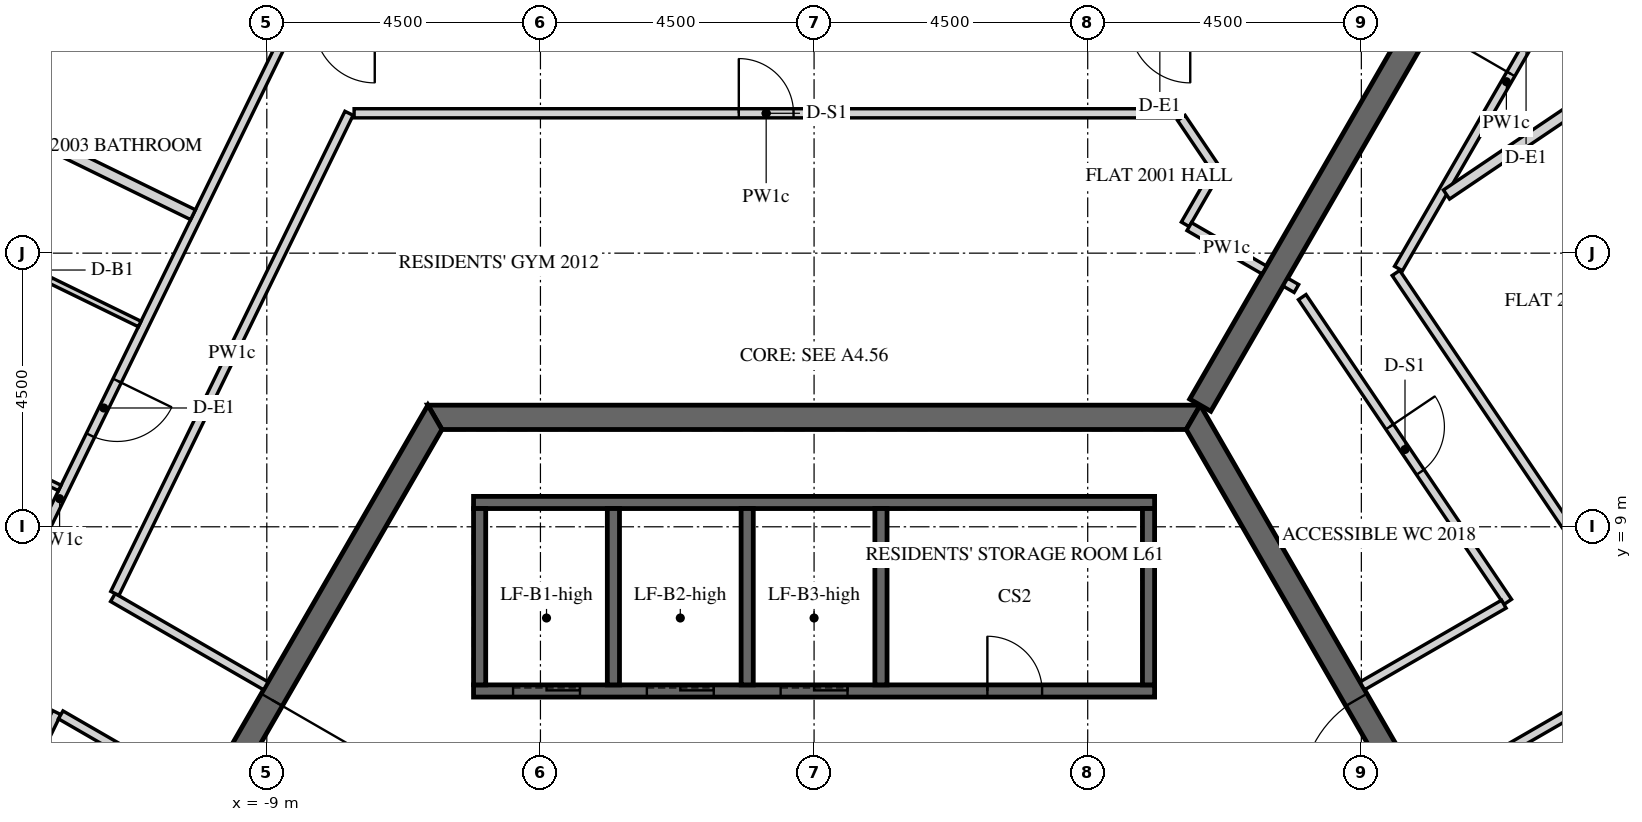
"""IFC4 building model, lengths in metres.
Left out: names, types, materials, properties, quantities, classifications, styles, units other than length and angle.
Written with IfcOpenShell. Run it as: python <this file> out.ifc"""

import sys

from ifc_helpers import new_model, si_unit, direction, frame, frame_2d, origin, place, context, subcontext, project, spatial, polyline, rectangle, outline, extrude, element, fill, save


model = new_model("IFC4")
c1 = context("Model", 3, precision=1e-05, world=origin(), true_north=direction((0.0, 1.0)))
c2 = subcontext(c1, "Body", "Model", "MODEL_VIEW")
j1 = project(units=[si_unit("LENGTHUNIT", "METRE"), si_unit("PLANEANGLEUNIT", "RADIAN")], contexts=[c1])
p1 = place(None, origin())
s1 = spatial("IfcSite", under=j1, at=p1, CompositionType="ELEMENT")
p2 = place(p1, origin())
s2 = spatial("IfcBuilding", under=s1, at=p2, CompositionType="ELEMENT")
p3 = place(p2, frame((0.0, 0.0, 256.2)))
s3 = spatial("IfcBuildingStorey", under=s2, at=p3, CompositionType="ELEMENT", Elevation=256.2)
p4 = place(p3, frame((-6.235, 10.8, 0.0), z_axis=(0.0, 0.0, 1.0), x_axis=(-0.499996419489, -0.866027470984, 0.0)))
e1 = element("IfcWall", 1, at=p4, inside=s3, PredefinedType="SHEAR", context=c2, shape_type="SweptSolid", body=[
    extrude(outline(polyline([(-0.115, -0.2), (12.586, -0.2), (12.355, 0.2), (0.115, 0.2), (-0.115, -0.2)])), origin(), (0.0, 0.0, 1.0), 3.75),
])
p5 = place(p4, frame((5.364, 0.0, 0.0)))
e2 = element("IfcOpeningElement", 2, at=p5, cuts=e1, PredefinedType="OPENING", context=c2, shape_type="SweptSolid", body=[
    extrude(rectangle(XDim=1.8, YDim=2.4, at=frame_2d((0.9, 1.2))), frame((0.0, 0.21, 0.0), z_axis=(0.0, -1.0, 0.0), x_axis=(1.0, 0.0, 0.0)), (0.0, 0.0, 1.0), 0.42),
])
p6 = place(p3, frame((12.471, 0.0, 0.0), z_axis=(0.0, 0.0, 1.0), x_axis=(-0.499996419489, 0.866027470984, 0.0)))
e3 = element("IfcWall", 3, at=p6, inside=s3, PredefinedType="SHEAR", context=c2, shape_type="SweptSolid", body=[
    extrude(outline(polyline([(-0.115, -0.2), (12.586, -0.2), (12.355, 0.2), (0.115, 0.2), (-0.115, -0.2)])), origin(), (0.0, 0.0, 1.0), 3.75),
])
p7 = place(p6, frame((5.306, 0.0, 0.0)))
e4 = element("IfcOpeningElement", 4, at=p7, cuts=e3, PredefinedType="OPENING", context=c2, shape_type="SweptSolid", body=[
    extrude(rectangle(XDim=1.8, YDim=2.4, at=frame_2d((0.9, 1.2))), frame((0.0, 0.21, 0.0), z_axis=(0.0, -1.0, 0.0), x_axis=(1.0, 0.0, 0.0)), (0.0, 0.0, 1.0), 0.42),
])
p8 = place(p3, frame((6.235, 10.8, 0.0), z_axis=(0.0, 0.0, 1.0), x_axis=(-1.0, 0.0, 0.0)))
e5 = element("IfcWall", 5, at=p8, inside=s3, PredefinedType="SHEAR", context=c2, shape_type="SweptSolid", body=[
    extrude(outline(polyline([(-0.115, -0.2), (12.586, -0.2), (12.355, 0.2), (0.115, 0.2), (-0.115, -0.2)])), origin(), (0.0, 0.0, 1.0), 3.75),
])
p9 = place(p3, frame((6.351, 11.0, 0.0), z_axis=(0.0, 0.0, 1.0), x_axis=(0.499998894578, 0.866026041999, 0.0)))
e6 = element("IfcWall", 6, at=p9, inside=s3, PredefinedType="SHEAR", context=c2, shape_type="SweptSolid", body=[
    extrude(rectangle(XDim=15.544, YDim=0.4, at=frame_2d((7.772, 0.0))), origin(), (0.0, 0.0, 1.0), 3.75),
])
p10 = place(p9, frame((6.872, 0.0, 0.0)))
e7 = element("IfcOpeningElement", 7, at=p10, cuts=e6, PredefinedType="OPENING", context=c2, shape_type="SweptSolid", body=[
    extrude(rectangle(XDim=1.8, YDim=2.4, at=frame_2d((0.9, 1.2))), frame((0.0, 0.21, 0.0), z_axis=(0.0, -1.0, 0.0), x_axis=(1.0, 0.0, 0.0)), (0.0, 0.0, 1.0), 0.42),
])
p11 = place(p3, frame((-5.6, 6.3, -0.5), z_axis=(0.0, 0.0, 1.0), x_axis=(1.0, 0.0, 0.0)))
e8 = element("IfcWall", 8, at=p11, inside=s3, PredefinedType="SHEAR", context=c2, shape_type="SweptSolid", body=[
    extrude(rectangle(XDim=11.2, YDim=0.2, at=frame_2d((5.6, 0.0))), origin(), (0.0, 0.0, 1.0), 4.15),
])
p12 = place(p11, frame((8.45, 0.0, 0.5)))
e9 = element("IfcOpeningElement", 9, at=p12, cuts=e8, PredefinedType="OPENING", context=c2, shape_type="SweptSolid", body=[
    extrude(rectangle(XDim=0.9, YDim=2.1, at=frame_2d((0.45, 1.05))), frame((0.0, 0.11, 0.0), z_axis=(0.0, -1.0, 0.0), x_axis=(1.0, 0.0, 0.0)), (0.0, 0.0, 1.0), 0.22),
])
p13 = place(p11, frame((0.65, 0.0, 0.5)))
e10 = element("IfcOpeningElement", 10, at=p13, cuts=e8, PredefinedType="OPENING", context=c2, shape_type="SweptSolid", body=[
    extrude(rectangle(XDim=1.1, YDim=2.1, at=frame_2d((0.55, 1.05))), frame((0.0, 0.11, 0.0), z_axis=(0.0, -1.0, 0.0), x_axis=(1.0, 0.0, 0.0)), (0.0, 0.0, 1.0), 0.22),
])
p14 = place(p11, frame((2.85, 0.0, 0.5)))
e11 = element("IfcOpeningElement", 11, at=p14, cuts=e8, PredefinedType="OPENING", context=c2, shape_type="SweptSolid", body=[
    extrude(rectangle(XDim=1.1, YDim=2.1, at=frame_2d((0.55, 1.05))), frame((0.0, 0.11, 0.0), z_axis=(0.0, -1.0, 0.0), x_axis=(1.0, 0.0, 0.0)), (0.0, 0.0, 1.0), 0.22),
])
p15 = place(p11, frame((5.05, 0.0, 0.5)))
e12 = element("IfcOpeningElement", 12, at=p15, cuts=e8, PredefinedType="OPENING", context=c2, shape_type="SweptSolid", body=[
    extrude(rectangle(XDim=1.1, YDim=2.1, at=frame_2d((0.55, 1.05))), frame((0.0, 0.11, 0.0), z_axis=(0.0, -1.0, 0.0), x_axis=(1.0, 0.0, 0.0)), (0.0, 0.0, 1.0), 0.22),
])
p16 = place(p3, frame((-5.6, 9.4, -0.5), z_axis=(0.0, 0.0, 1.0), x_axis=(1.0, 0.0, 0.0)))
e13 = element("IfcWall", 13, at=p16, inside=s3, PredefinedType="SHEAR", context=c2, shape_type="SweptSolid", body=[
    extrude(rectangle(XDim=11.2, YDim=0.2, at=frame_2d((5.6, 0.0))), origin(), (0.0, 0.0, 1.0), 4.15),
])
for number, where, z_axis, x_axis in (
    (14, (-5.5, 6.4, -0.5), (0.0, 0.0, 1.0), (0.0, 1.0, 0.0)),
    (15, (-3.3, 6.4, -0.5), (0.0, 0.0, 1.0), (0.0, 1.0, 0.0)),
    (16, (-1.1, 6.4, -0.5), (0.0, 0.0, 1.0), (0.0, 1.0, 0.0)),
    (17, (1.1, 6.4, -0.5), (0.0, 0.0, 1.0), (0.0, 1.0, 0.0)),
    (18, (5.5, 6.4, -0.5), (0.0, 0.0, 1.0), (0.0, 1.0, 0.0)),
):
    element("IfcWall", number, at=place(p3, frame(where, z_axis=z_axis, x_axis=x_axis)), inside=s3, PredefinedType="SHEAR", context=c2, shape_type="SweptSolid", body=[
        extrude(rectangle(XDim=2.9, YDim=0.2, at=frame_2d((1.45, 0.0))), origin(), (0.0, 0.0, 1.0), 4.15),
    ])
p17 = place(p3, frame((-8.622, 17.225, 0.0), z_axis=(0.0, 0.0, 1.0), x_axis=(-0.438366544921, -0.898796290765, 0.0)))
e19 = element("IfcWall", 19, at=p17, inside=s3, PredefinedType="PARTITIONING", context=c2, shape_type="SweptSolid", body=[
    extrude(rectangle(XDim=17.273, YDim=0.15, at=frame_2d((8.637, 0.0))), origin(), (0.0, 0.0, 1.0), 2.823),
])
p18 = place(p17, frame((6.478, 0.0, 0.0)))
e20 = element("IfcOpeningElement", 20, at=p18, cuts=e19, PredefinedType="OPENING", context=c2, shape_type="SweptSolid", body=[
    extrude(rectangle(XDim=1.0, YDim=2.1, at=frame_2d((0.5, 1.05))), frame((0.0, 0.085, 0.0), z_axis=(0.0, -1.0, 0.0), x_axis=(1.0, 0.0, 0.0)), (0.0, 0.0, 1.0), 0.17),
])
p19 = place(p3, frame((-9.016, 6.384, 0.0), z_axis=(0.0, 0.0, 1.0), x_axis=(-0.866010648346, 0.500025556299, 0.0)))
e21 = element("IfcWall", 21, at=p19, inside=s3, PredefinedType="PARTITIONING", context=c2, shape_type="SweptSolid", body=[
    extrude(rectangle(XDim=2.905, YDim=0.15, at=frame_2d((1.453, 0.0))), origin(), (0.0, 0.0, 1.0), 2.823),
])
p20 = place(p3, frame((-11.499, 7.905, 0.0), z_axis=(0.0, 0.0, 1.0), x_axis=(0.438365041944, 0.898797023805, 0.0)))
e22 = element("IfcWall", 22, at=p20, inside=s3, PredefinedType="PARTITIONING", context=c2, shape_type="SweptSolid", body=[
    extrude(rectangle(XDim=8.784, YDim=0.15, at=frame_2d((4.392, 0.0))), origin(), (0.0, 0.0, 1.0), 2.823),
])
p21 = place(p3, frame((-7.564, 15.8, 0.0), z_axis=(0.0, 0.0, 1.0), x_axis=(1.0, 0.0, 0.0)))
e23 = element("IfcWall", 23, at=p21, inside=s3, PredefinedType="PARTITIONING", context=c2, shape_type="SweptSolid", body=[
    extrude(rectangle(XDim=13.553, YDim=0.15, at=frame_2d((6.776, 0.0))), origin(), (0.0, 0.0, 1.0), 2.823),
])
p22 = place(p21, frame((6.326, 0.0, 0.0)))
e24 = element("IfcOpeningElement", 24, at=p22, cuts=e23, PredefinedType="OPENING", context=c2, shape_type="SweptSolid", body=[
    extrude(rectangle(XDim=0.9, YDim=2.1, at=frame_2d((0.45, 1.05))), frame((0.0, 0.085, 0.0), z_axis=(0.0, -1.0, 0.0), x_axis=(1.0, 0.0, 0.0)), (0.0, 0.0, 1.0), 0.17),
])
p23 = place(p3, frame((6.039, 15.725, 0.0), z_axis=(0.0, 0.0, 1.0), x_axis=(0.559307154107, -0.828960498073, 0.0)))
e25 = element("IfcWall", 25, at=p23, inside=s3, PredefinedType="PARTITIONING", context=c2, shape_type="SweptSolid", body=[
    extrude(rectangle(XDim=1.038, YDim=0.15, at=frame_2d((0.519, 0.0))), origin(), (0.0, 0.0, 1.0), 2.823),
])
p24 = place(p3, frame((6.578, 14.793, 0.0), z_axis=(0.0, 0.0, 1.0), x_axis=(-0.499998034377, -0.866026538634, 0.0)))
e26 = element("IfcWall", 26, at=p24, inside=s3, PredefinedType="PARTITIONING", context=c2, shape_type="SweptSolid", body=[
    extrude(rectangle(XDim=0.946, YDim=0.15, at=frame_2d((0.473, 0.0))), origin(), (0.0, 0.0, 1.0), 2.823),
])
p25 = place(p3, frame((6.17, 13.936, 0.0), z_axis=(0.0, 0.0, 1.0), x_axis=(0.865988727248, -0.500063520245, 0.0)))
e27 = element("IfcWall", 27, at=p25, inside=s3, PredefinedType="PARTITIONING", context=c2, shape_type="SweptSolid", body=[
    extrude(rectangle(XDim=1.425, YDim=0.15, at=frame_2d((0.712, 0.0))), origin(), (0.0, 0.0, 1.0), 2.823),
])
p26 = place(p3, frame((-15.079, 0.564, 0.0), z_axis=(0.0, 0.0, 1.0), x_axis=(0.438367391904, 0.898795877669, 0.0)))
e28 = element("IfcWall", 28, at=p26, inside=s3, PredefinedType="PARTITIONING", context=c2, shape_type="SweptSolid", body=[
    extrude(rectangle(XDim=5.987, YDim=0.15, at=frame_2d((2.994, 0.0))), origin(), (0.0, 0.0, 1.0), 2.823),
])
p27 = place(p26, frame((2.543, 0.0, 0.0)))
e29 = element("IfcOpeningElement", 29, at=p27, cuts=e28, PredefinedType="OPENING", context=c2, shape_type="SweptSolid", body=[
    extrude(rectangle(XDim=0.9, YDim=2.1, at=frame_2d((0.45, 1.05))), frame((0.0, 0.085, 0.0), z_axis=(0.0, -1.0, 0.0), x_axis=(1.0, 0.0, 0.0)), (0.0, 0.0, 1.0), 0.17),
])
p28 = place(p3, frame((-12.389, 5.907, 0.0), z_axis=(0.0, 0.0, 1.0), x_axis=(0.866034066097, -0.499984996134, 0.0)))
e30 = element("IfcWall", 30, at=p28, inside=s3, PredefinedType="PARTITIONING", context=c2, shape_type="SweptSolid", body=[
    extrude(rectangle(XDim=2.683, YDim=0.15, at=frame_2d((1.342, 0.0))), origin(), (0.0, 0.0, 1.0), 2.823),
])
p29 = place(p3, frame((19.228, -1.146, 0.0), z_axis=(0.0, 0.0, 1.0), x_axis=(-0.559190017735, 0.829039519001, 0.0)))
e31 = element("IfcWall", 31, at=p29, inside=s3, PredefinedType="PARTITIONING", context=c2, shape_type="SweptSolid", body=[
    extrude(rectangle(XDim=17.273, YDim=0.15, at=frame_2d((8.637, 0.0))), origin(), (0.0, 0.0, 1.0), 2.823),
])
p30 = place(p29, frame((6.478, 0.0, 0.0)))
e32 = element("IfcOpeningElement", 32, at=p30, cuts=e31, PredefinedType="OPENING", context=c2, shape_type="SweptSolid", body=[
    extrude(rectangle(XDim=1.0, YDim=2.1, at=frame_2d((0.5, 1.05))), frame((0.0, 0.085, 0.0), z_axis=(0.0, -1.0, 0.0), x_axis=(1.0, 0.0, 0.0)), (0.0, 0.0, 1.0), 0.17),
])
p31 = place(p3, frame((9.611, 13.246, 0.0), z_axis=(0.0, 0.0, 1.0), x_axis=(0.499994435258, 0.866028616566, 0.0)))
e33 = element("IfcWall", 33, at=p31, inside=s3, PredefinedType="PARTITIONING", context=c2, shape_type="SweptSolid", body=[
    extrude(rectangle(XDim=7.097, YDim=0.15, at=frame_2d((3.548, 0.0))), origin(), (0.0, 0.0, 1.0), 2.823),
])
p32 = place(p31, frame((3.696, 0.0, 0.0)))
e34 = element("IfcOpeningElement", 34, at=p32, cuts=e33, PredefinedType="OPENING", context=c2, shape_type="SweptSolid", body=[
    extrude(rectangle(XDim=1.0, YDim=2.1, at=frame_2d((0.5, 1.05))), frame((0.0, 0.085, 0.0), z_axis=(0.0, -1.0, 0.0), x_axis=(1.0, 0.0, 0.0)), (0.0, 0.0, 1.0), 0.17),
])
p33 = place(p3, frame((10.066, 4.566, 0.0), z_axis=(0.0, 0.0, 1.0), x_axis=(0.866034661658, 0.49998396455, 0.0)))
e35 = element("IfcWall", 35, at=p33, inside=s3, PredefinedType="PARTITIONING", context=c2, shape_type="SweptSolid", body=[
    extrude(rectangle(XDim=2.909, YDim=0.15, at=frame_2d((1.455, 0.0))), origin(), (0.0, 0.0, 1.0), 2.823),
])
p34 = place(p3, frame((7.75, 13.024, 0.0), z_axis=(0.0, 0.0, 1.0), x_axis=(0.866088799389, -0.499890179513, 0.0)))
e36 = element("IfcWall", 36, at=p34, inside=s3, PredefinedType="PARTITIONING", context=c2, shape_type="SweptSolid", body=[
    extrude(rectangle(XDim=0.21, YDim=0.15, at=frame_2d((0.105, 0.0))), origin(), (0.0, 0.0, 1.0), 2.823),
])
p35 = place(p3, frame((8.028, 12.777, 0.0), z_axis=(0.0, 0.0, 1.0), x_axis=(0.559175239609, -0.829049486707, 0.0)))
e37 = element("IfcWall", 37, at=p35, inside=s3, PredefinedType="PARTITIONING", context=c2, shape_type="SweptSolid", body=[
    extrude(rectangle(XDim=6.045, YDim=0.15, at=frame_2d((3.022, 0.0))), origin(), (0.0, 0.0, 1.0), 2.823),
])
p36 = place(p35, frame((2.572, 0.0, 0.0)))
e38 = element("IfcOpeningElement", 38, at=p36, cuts=e37, PredefinedType="OPENING", context=c2, shape_type="SweptSolid", body=[
    extrude(rectangle(XDim=0.9, YDim=2.1, at=frame_2d((0.45, 1.05))), frame((0.0, 0.085, 0.0), z_axis=(0.0, -1.0, 0.0), x_axis=(1.0, 0.0, 0.0)), (0.0, 0.0, 1.0), 0.17),
])
p37 = place(p3, frame((11.343, 7.728, 0.0), z_axis=(0.0, 0.0, 1.0), x_axis=(-0.866037314867, -0.499979368833, 0.0)))
e39 = element("IfcWall", 39, at=p37, inside=s3, PredefinedType="PARTITIONING", context=c2, shape_type="SweptSolid", body=[
    extrude(rectangle(XDim=2.687, YDim=0.15, at=frame_2d((1.344, 0.0))), origin(), (0.0, 0.0, 1.0), 2.823),
])
p38 = place(p3, frame((-17.516, 17.694, 0.0), z_axis=(0.0, 0.0, 1.0), x_axis=(0.898794723364, -0.438369758597, 0.0)))
e40 = element("IfcWall", 40, at=p38, inside=s3, PredefinedType="PARTITIONING", context=c2, shape_type="SweptSolid", body=[
    extrude(rectangle(XDim=8.125, YDim=0.18, at=frame_2d((4.062, 0.0))), origin(), (0.0, 0.0, 1.0), 2.823),
])
p39 = place(p3, frame((-12.405, 9.638, 0.0), z_axis=(0.0, 0.0, 1.0), x_axis=(-0.898810534939, 0.438337338454, 0.0)))
e41 = element("IfcWall", 41, at=p39, inside=s3, PredefinedType="PARTITIONING", context=c2, shape_type="SweptSolid", body=[
    extrude(rectangle(XDim=4.125, YDim=0.1, at=frame_2d((2.062, 0.0))), origin(), (0.0, 0.0, 1.0), 2.823),
])
p40 = place(p39, frame((1.575, 0.0, 0.0)))
e42 = element("IfcOpeningElement", 42, at=p40, cuts=e41, PredefinedType="OPENING", context=c2, shape_type="SweptSolid", body=[
    extrude(rectangle(XDim=0.9, YDim=2.1, at=frame_2d((0.45, 1.05))), frame((0.0, 0.06, 0.0), z_axis=(0.0, -1.0, 0.0), x_axis=(1.0, 0.0, 0.0)), (0.0, 0.0, 1.0), 0.12),
])
p41 = place(p3, frame((-11.09, 12.335, 0.0), z_axis=(0.0, 0.0, 1.0), x_axis=(-0.898787215731, 0.438385151252, 0.0)))
e43 = element("IfcWall", 43, at=p41, inside=s3, PredefinedType="PARTITIONING", context=c2, shape_type="SweptSolid", body=[
    extrude(rectangle(XDim=4.125, YDim=0.1, at=frame_2d((2.062, 0.0))), origin(), (0.0, 0.0, 1.0), 2.823),
])
p42 = place(p41, frame((1.625, 0.0, 0.0)))
e44 = element("IfcOpeningElement", 44, at=p42, cuts=e43, PredefinedType="OPENING", context=c2, shape_type="SweptSolid", body=[
    extrude(rectangle(XDim=0.8, YDim=2.1, at=frame_2d((0.4, 1.05))), frame((0.0, 0.06, 0.0), z_axis=(0.0, -1.0, 0.0), x_axis=(1.0, 0.0, 0.0)), (0.0, 0.0, 1.0), 0.12),
])
p43 = place(p3, frame((16.029, 18.26, 0.0), z_axis=(0.0, 0.0, 1.0), x_axis=(-0.82904538001, -0.559181328268, 0.0)))
e45 = element("IfcWall", 45, at=p43, inside=s3, PredefinedType="PARTITIONING", context=c2, shape_type="SweptSolid", body=[
    extrude(rectangle(XDim=6.79, YDim=0.18, at=frame_2d((3.395, 0.0))), origin(), (0.0, 0.0, 1.0), 2.823),
])
p44 = place(p5, origin())
e46 = element("IfcDoor", 46, at=p44, inside=s3, OperationType="DOUBLE_DOOR_SINGLE_SWING", PredefinedType="DOOR", context=c2, shape_type="SweptSolid", body=[
    extrude(rectangle(XDim=1.8, YDim=2.4, at=frame_2d((0.9, 1.2))), frame((0.0, 0.025, 0.0), z_axis=(0.0, -1.0, 0.0), x_axis=(1.0, 0.0, 0.0)), (0.0, 0.0, 1.0), 0.05),
])
fill(e2, e46)
p45 = place(p7, origin())
e47 = element("IfcDoor", 47, at=p45, inside=s3, OperationType="DOUBLE_DOOR_SINGLE_SWING", PredefinedType="DOOR", context=c2, shape_type="SweptSolid", body=[
    extrude(rectangle(XDim=1.8, YDim=2.4, at=frame_2d((0.9, 1.2))), frame((0.0, 0.025, 0.0), z_axis=(0.0, -1.0, 0.0), x_axis=(1.0, 0.0, 0.0)), (0.0, 0.0, 1.0), 0.05),
])
fill(e4, e47)
p46 = place(p12, origin())
e48 = element("IfcDoor", 48, at=p46, inside=s3, OperationType="SINGLE_SWING_LEFT", PredefinedType="DOOR", context=c2, shape_type="SweptSolid", body=[
    extrude(rectangle(XDim=0.9, YDim=2.1, at=frame_2d((0.45, 1.05))), frame((0.0, 0.025, 0.0), z_axis=(0.0, -1.0, 0.0), x_axis=(1.0, 0.0, 0.0)), (0.0, 0.0, 1.0), 0.05),
])
fill(e9, e48)
p47 = place(p13, origin())
e49 = element("IfcDoor", 49, at=p47, inside=s3, OperationType="SLIDING_TO_LEFT", PredefinedType="DOOR", context=c2, shape_type="SweptSolid", body=[
    extrude(rectangle(XDim=1.1, YDim=2.1, at=frame_2d((0.55, 1.05))), frame((0.0, 0.025, 0.0), z_axis=(0.0, -1.0, 0.0), x_axis=(1.0, 0.0, 0.0)), (0.0, 0.0, 1.0), 0.05),
])
fill(e10, e49)
p48 = place(p14, origin())
e50 = element("IfcDoor", 50, at=p48, inside=s3, OperationType="SLIDING_TO_LEFT", PredefinedType="DOOR", context=c2, shape_type="SweptSolid", body=[
    extrude(rectangle(XDim=1.1, YDim=2.1, at=frame_2d((0.55, 1.05))), frame((0.0, 0.025, 0.0), z_axis=(0.0, -1.0, 0.0), x_axis=(1.0, 0.0, 0.0)), (0.0, 0.0, 1.0), 0.05),
])
fill(e11, e50)
p49 = place(p15, origin())
e51 = element("IfcDoor", 51, at=p49, inside=s3, OperationType="SLIDING_TO_LEFT", PredefinedType="DOOR", context=c2, shape_type="SweptSolid", body=[
    extrude(rectangle(XDim=1.1, YDim=2.1, at=frame_2d((0.55, 1.05))), frame((0.0, 0.025, 0.0), z_axis=(0.0, -1.0, 0.0), x_axis=(1.0, 0.0, 0.0)), (0.0, 0.0, 1.0), 0.05),
])
fill(e12, e51)
p50 = place(p18, origin())
e52 = element("IfcDoor", 52, at=p50, inside=s3, OperationType="SINGLE_SWING_RIGHT", PredefinedType="DOOR", context=c2, shape_type="SweptSolid", body=[
    extrude(rectangle(XDim=1.0, YDim=2.1, at=frame_2d((0.5, 1.05))), frame((0.0, 0.025, 0.0), z_axis=(0.0, -1.0, 0.0), x_axis=(1.0, 0.0, 0.0)), (0.0, 0.0, 1.0), 0.05),
])
fill(e20, e52)
p51 = place(p32, origin())
e53 = element("IfcDoor", 53, at=p51, inside=s3, OperationType="SINGLE_SWING_RIGHT", PredefinedType="DOOR", context=c2, shape_type="SweptSolid", body=[
    extrude(rectangle(XDim=1.0, YDim=2.1, at=frame_2d((0.5, 1.05))), frame((0.0, 0.025, 0.0), z_axis=(0.0, -1.0, 0.0), x_axis=(1.0, 0.0, 0.0)), (0.0, 0.0, 1.0), 0.05),
])
fill(e34, e53)
p52 = place(p22, origin())
e54 = element("IfcDoor", 54, at=p52, inside=s3, OperationType="SINGLE_SWING_LEFT", PredefinedType="DOOR", context=c2, shape_type="SweptSolid", body=[
    extrude(rectangle(XDim=0.9, YDim=2.1, at=frame_2d((0.45, 1.05))), frame((0.0, 0.025, 0.0), z_axis=(0.0, -1.0, 0.0), x_axis=(1.0, 0.0, 0.0)), (0.0, 0.0, 1.0), 0.05),
])
fill(e24, e54)
p53 = place(p36, origin())
e55 = element("IfcDoor", 55, at=p53, inside=s3, OperationType="SINGLE_SWING_RIGHT", PredefinedType="DOOR", context=c2, shape_type="SweptSolid", body=[
    extrude(rectangle(XDim=0.9, YDim=2.1, at=frame_2d((0.45, 1.05))), frame((0.0, 0.025, 0.0), z_axis=(0.0, -1.0, 0.0), x_axis=(1.0, 0.0, 0.0)), (0.0, 0.0, 1.0), 0.05),
])
fill(e38, e55)
save(model, sys.argv[1])
